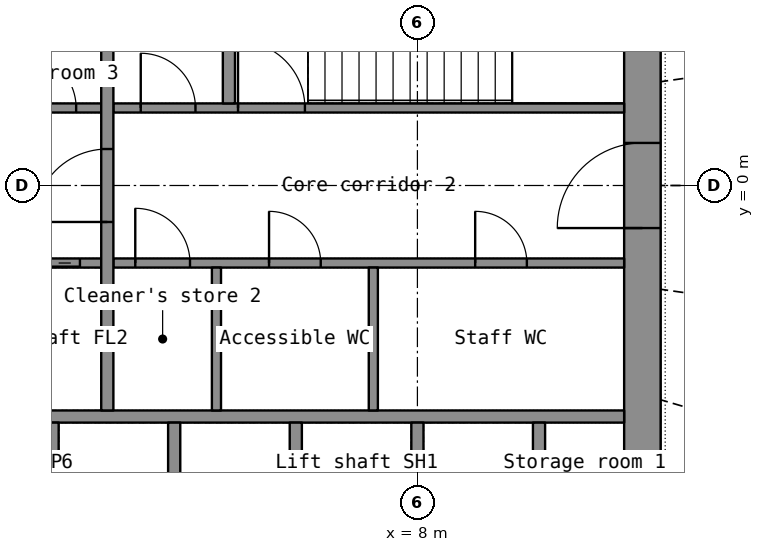
"""IFC4 building model, lengths in metres.
Left out: names, types, materials, properties, quantities, classifications, styles, units other than length and angle.
Written with IfcOpenShell. Run it as: python <this file> out.ifc"""

import sys

from ifc_helpers import new_model, si_unit, direction, frame, frame_2d, origin, place, context, subcontext, project, spatial, rectangle, extrude, element, fill, save


model = new_model("IFC4")
c1 = context("Model", 3, precision=1e-05, world=origin(), true_north=direction((0.0, 1.0)))
c2 = subcontext(c1, "Body", "Model", "MODEL_VIEW")
j1 = project(units=[si_unit("LENGTHUNIT", "METRE"), si_unit("PLANEANGLEUNIT", "RADIAN")], contexts=[c1])
p1 = place(None, origin())
s1 = spatial("IfcSite", under=j1, at=p1, CompositionType="ELEMENT")
p2 = place(p1, origin())
s2 = spatial("IfcBuilding", under=s1, at=p2, CompositionType="ELEMENT")
p3 = place(p2, frame((0.0, 0.0, 92.6)))
s3 = spatial("IfcBuildingStorey", under=s2, at=p3, CompositionType="ELEMENT", Elevation=92.6)
p4 = place(p3, frame((11.7, -7.2, 0.0), z_axis=(0.0, 0.0, 1.0), x_axis=(0.0, 1.0, 0.0)))
e1 = element("IfcWall", 1, at=p4, inside=s3, PredefinedType="SHEAR", context=c2, shape_type="SweptSolid", body=[
    extrude(rectangle(XDim=14.4, YDim=0.6, at=frame_2d((7.2, 0.0))), origin(), (0.0, 0.0, 1.0), 4.1),
])
p5 = place(p4, frame((6.5, 0.0, 0.0)))
e2 = element("IfcOpeningElement", 2, at=p5, cuts=e1, PredefinedType="OPENING", context=c2, shape_type="SweptSolid", body=[
    extrude(rectangle(XDim=1.4, YDim=2.2, at=frame_2d((0.7, 1.1))), frame((0.0, 0.31, 0.0), z_axis=(0.0, -1.0, 0.0), x_axis=(1.0, 0.0, 0.0)), (0.0, 0.0, 1.0), 0.62),
])
p6 = place(p3, frame((-11.4, -3.8, 0.0), z_axis=(0.0, 0.0, 1.0), x_axis=(1.0, 0.0, 0.0)))
e3 = element("IfcWall", 3, at=p6, inside=s3, PredefinedType="SHEAR", context=c2, shape_type="SweptSolid", body=[
    extrude(rectangle(XDim=22.8, YDim=0.2, at=frame_2d((11.4, 0.0))), origin(), (0.0, 0.0, 1.0), 4.1),
])
for number, where, z_axis, x_axis in (
    (4, (2.0, -6.6, 0.0), (0.0, 0.0, 1.0), (0.0, 1.0, 0.0)),
    (5, (4.0, -6.6, 0.0), (0.0, 0.0, 1.0), (0.0, 1.0, 0.0)),
    (6, (6.0, -6.6, 0.0), (0.0, 0.0, 1.0), (0.0, 1.0, 0.0)),
    (7, (8.0, -6.6, 0.0), (0.0, 0.0, 1.0), (0.0, 1.0, 0.0)),
    (8, (10.0, -6.6, 0.0), (0.0, 0.0, 1.0), (0.0, 1.0, 0.0)),
):
    element("IfcWall", number, at=place(p3, frame(where, z_axis=z_axis, x_axis=x_axis)), inside=s3, PredefinedType="SHEAR", context=c2, shape_type="SweptSolid", body=[
        extrude(rectangle(XDim=2.7, YDim=0.2, at=frame_2d((1.35, 0.0))), origin(), (0.0, 0.0, 1.0), 4.1),
    ])
p7 = place(p3, frame((-2.8, -1.275, 0.0), z_axis=(0.0, 0.0, 1.0), x_axis=(1.0, 0.0, 0.0)))
e9 = element("IfcWall", 9, at=p7, inside=s3, PredefinedType="SHEAR", context=c2, shape_type="SweptSolid", body=[
    extrude(rectangle(XDim=5.6, YDim=0.15, at=frame_2d((2.8, 0.0))), origin(), (0.0, 0.0, 1.0), 4.1),
])
p8 = place(p7, frame((4.15, 0.0, 0.0)))
e10 = element("IfcOpeningElement", 10, at=p8, cuts=e9, PredefinedType="OPENING", context=c2, shape_type="SweptSolid", body=[
    extrude(rectangle(XDim=1.1, YDim=2.2, at=frame_2d((0.55, 1.1))), frame((0.0, 0.085, 0.0), z_axis=(0.0, -1.0, 0.0), x_axis=(1.0, 0.0, 0.0)), (0.0, 0.0, 1.0), 0.17),
])
p9 = place(p7, frame((0.499, 0.0, 0.0)))
e11 = element("IfcOpeningElement", 11, at=p9, cuts=e9, PredefinedType="OPENING", context=c2, shape_type="SweptSolid", body=[
    extrude(rectangle(XDim=0.9, YDim=2.1, at=frame_2d((0.45, 1.05))), frame((0.0, 0.085, 0.0), z_axis=(0.0, -1.0, 0.0), x_axis=(1.0, 0.0, 0.0)), (0.0, 0.0, 1.0), 0.17),
])
p10 = place(p7, frame((2.374, 0.0, 0.0)))
e12 = element("IfcOpeningElement", 12, at=p10, cuts=e9, PredefinedType="OPENING", context=c2, shape_type="SweptSolid", body=[
    extrude(rectangle(XDim=0.9, YDim=2.1, at=frame_2d((0.45, 1.05))), frame((0.0, 0.085, 0.0), z_axis=(0.0, -1.0, 0.0), x_axis=(1.0, 0.0, 0.0)), (0.0, 0.0, 1.0), 0.17),
])
p11 = place(p3, frame((3.0, -1.275, 0.0), z_axis=(0.0, 0.0, 1.0), x_axis=(1.0, 0.0, 0.0)))
e13 = element("IfcWall", 13, at=p11, inside=s3, PredefinedType="PARTITIONING", context=c2, shape_type="SweptSolid", body=[
    extrude(rectangle(XDim=8.4, YDim=0.15, at=frame_2d((4.2, 0.0))), origin(), (0.0, 0.0, 1.0), 4.1),
])
p12 = place(p11, frame((0.36, 0.0, 0.0)))
e14 = element("IfcOpeningElement", 14, at=p12, cuts=e13, PredefinedType="OPENING", context=c2, shape_type="SweptSolid", body=[
    extrude(rectangle(XDim=0.9, YDim=2.1, at=frame_2d((0.45, 1.05))), frame((0.0, 0.085, 0.0), z_axis=(0.0, -1.0, 0.0), x_axis=(1.0, 0.0, 0.0)), (0.0, 0.0, 1.0), 0.17),
])
p13 = place(p11, frame((2.56, 0.0, 0.0)))
e15 = element("IfcOpeningElement", 15, at=p13, cuts=e13, PredefinedType="OPENING", context=c2, shape_type="SweptSolid", body=[
    extrude(rectangle(XDim=0.85, YDim=2.1, at=frame_2d((0.425, 1.05))), frame((0.0, 0.085, 0.0), z_axis=(0.0, -1.0, 0.0), x_axis=(1.0, 0.0, 0.0)), (0.0, 0.0, 1.0), 0.17),
])
p14 = place(p11, frame((5.95, 0.0, 0.0)))
e16 = element("IfcOpeningElement", 16, at=p14, cuts=e13, PredefinedType="OPENING", context=c2, shape_type="SweptSolid", body=[
    extrude(rectangle(XDim=0.85, YDim=2.1, at=frame_2d((0.425, 1.05))), frame((0.0, 0.085, 0.0), z_axis=(0.0, -1.0, 0.0), x_axis=(1.0, 0.0, 0.0)), (0.0, 0.0, 1.0), 0.17),
])
p15 = place(p3, frame((-2.8, 1.275, 0.0), z_axis=(0.0, 0.0, 1.0), x_axis=(1.0, 0.0, 0.0)))
e17 = element("IfcWall", 17, at=p15, inside=s3, PredefinedType="SHEAR", context=c2, shape_type="SweptSolid", body=[
    extrude(rectangle(XDim=5.6, YDim=0.15, at=frame_2d((2.8, 0.0))), origin(), (0.0, 0.0, 1.0), 4.1),
])
p16 = place(p15, frame((0.35, 0.0, 0.0)))
e18 = element("IfcOpeningElement", 18, at=p16, cuts=e17, PredefinedType="OPENING", context=c2, shape_type="SweptSolid", body=[
    extrude(rectangle(XDim=1.1, YDim=2.2, at=frame_2d((0.55, 1.1))), frame((0.0, 0.085, 0.0), z_axis=(0.0, -1.0, 0.0), x_axis=(1.0, 0.0, 0.0)), (0.0, 0.0, 1.0), 0.17),
])
p17 = place(p15, frame((2.413, 0.0, 0.0)))
e19 = element("IfcOpeningElement", 19, at=p17, cuts=e17, PredefinedType="OPENING", context=c2, shape_type="SweptSolid", body=[
    extrude(rectangle(XDim=0.9, YDim=2.1, at=frame_2d((0.45, 1.05))), frame((0.0, 0.085, 0.0), z_axis=(0.0, -1.0, 0.0), x_axis=(1.0, 0.0, 0.0)), (0.0, 0.0, 1.0), 0.17),
])
p18 = place(p15, frame((4.288, 0.0, 0.0)))
e20 = element("IfcOpeningElement", 20, at=p18, cuts=e17, PredefinedType="OPENING", context=c2, shape_type="SweptSolid", body=[
    extrude(rectangle(XDim=0.9, YDim=2.1, at=frame_2d((0.45, 1.05))), frame((0.0, 0.085, 0.0), z_axis=(0.0, -1.0, 0.0), x_axis=(1.0, 0.0, 0.0)), (0.0, 0.0, 1.0), 0.17),
])
p19 = place(p3, frame((3.0, 1.275, 0.0), z_axis=(0.0, 0.0, 1.0), x_axis=(1.0, 0.0, 0.0)))
e21 = element("IfcWall", 21, at=p19, inside=s3, PredefinedType="SHEAR", context=c2, shape_type="SweptSolid", body=[
    extrude(rectangle(XDim=8.4, YDim=0.15, at=frame_2d((4.2, 0.0))), origin(), (0.0, 0.0, 1.0), 4.1),
])
p20 = place(p19, frame((2.05, 0.0, 0.0)))
e22 = element("IfcOpeningElement", 22, at=p20, cuts=e21, PredefinedType="OPENING", context=c2, shape_type="SweptSolid", body=[
    extrude(rectangle(XDim=1.1, YDim=2.15, at=frame_2d((0.55, 1.075))), frame((0.0, 0.085, 0.0), z_axis=(0.0, -1.0, 0.0), x_axis=(1.0, 0.0, 0.0)), (0.0, 0.0, 1.0), 0.17),
])
p21 = place(p19, frame((0.45, 0.0, 0.0)))
e23 = element("IfcOpeningElement", 23, at=p21, cuts=e21, PredefinedType="OPENING", context=c2, shape_type="SweptSolid", body=[
    extrude(rectangle(XDim=0.9, YDim=2.1, at=frame_2d((0.45, 1.05))), frame((0.0, 0.085, 0.0), z_axis=(0.0, -1.0, 0.0), x_axis=(1.0, 0.0, 0.0)), (0.0, 0.0, 1.0), 0.17),
])
p22 = place(p3, frame((2.9, -3.7, 0.0), z_axis=(0.0, 0.0, 1.0), x_axis=(0.0, 1.0, 0.0)))
e24 = element("IfcWall", 24, at=p22, inside=s3, PredefinedType="SHEAR", context=c2, shape_type="SweptSolid", body=[
    extrude(rectangle(XDim=7.4, YDim=0.2, at=frame_2d((3.7, 0.0))), origin(), (0.0, 0.0, 1.0), 4.1),
])
p23 = place(p22, frame((3.1, 0.0, 0.0)))
e25 = element("IfcOpeningElement", 25, at=p23, cuts=e24, PredefinedType="OPENING", context=c2, shape_type="SweptSolid", body=[
    extrude(rectangle(XDim=1.2, YDim=2.2, at=frame_2d((0.6, 1.1))), frame((0.0, 0.11, 0.0), z_axis=(0.0, -1.0, 0.0), x_axis=(1.0, 0.0, 0.0)), (0.0, 0.0, 1.0), 0.22),
])
p24 = place(p3, frame((4.9, 1.35, 0.0), z_axis=(0.0, 0.0, 1.0), x_axis=(0.0, 1.0, 0.0)))
e26 = element("IfcWall", 26, at=p24, inside=s3, PredefinedType="SHEAR", context=c2, shape_type="SweptSolid", body=[
    extrude(rectangle(XDim=2.35, YDim=0.2, at=frame_2d((1.175, 0.0))), origin(), (0.0, 0.0, 1.0), 4.1),
])
for number, where, z_axis, x_axis in (
    (27, (4.695, -3.7, 0.0), (0.0, 0.0, 1.0), (0.0, 1.0, 0.0)),
    (28, (7.275, -3.7, 0.0), (0.0, 0.0, 1.0), (0.0, 1.0, 0.0)),
):
    element("IfcWall", number, at=place(p3, frame(where, z_axis=z_axis, x_axis=x_axis)), inside=s3, PredefinedType="PARTITIONING", context=c2, shape_type="SweptSolid", body=[
        extrude(rectangle(XDim=2.35, YDim=0.15, at=frame_2d((1.175, 0.0))), origin(), (0.0, 0.0, 1.0), 4.1),
    ])
p25 = place(p5, origin())
e29 = element("IfcDoor", 29, at=p25, inside=s3, OperationType="DOUBLE_DOOR_SINGLE_SWING", PredefinedType="DOOR", context=c2, shape_type="SweptSolid", body=[
    extrude(rectangle(XDim=1.4, YDim=2.2, at=frame_2d((0.7, 1.1))), frame((0.0, 0.025, 0.0), z_axis=(0.0, -1.0, 0.0), x_axis=(1.0, 0.0, 0.0)), (0.0, 0.0, 1.0), 0.05),
])
fill(e2, e29)
p26 = place(p23, origin())
e30 = element("IfcDoor", 30, at=p26, inside=s3, OperationType="SINGLE_SWING_LEFT", PredefinedType="DOOR", context=c2, shape_type="SweptSolid", body=[
    extrude(rectangle(XDim=1.2, YDim=2.2, at=frame_2d((0.6, 1.1))), frame((0.0, 0.025, 0.0), z_axis=(0.0, -1.0, 0.0), x_axis=(1.0, 0.0, 0.0)), (0.0, 0.0, 1.0), 0.05),
])
fill(e25, e30)
p27 = place(p8, origin())
e31 = element("IfcDoor", 31, at=p27, inside=s3, OperationType="DOUBLE_DOOR_SLIDING", PredefinedType="DOOR", context=c2, shape_type="SweptSolid", body=[
    extrude(rectangle(XDim=1.1, YDim=2.2, at=frame_2d((0.55, 1.1))), frame((0.0, 0.025, 0.0), z_axis=(0.0, -1.0, 0.0), x_axis=(1.0, 0.0, 0.0)), (0.0, 0.0, 1.0), 0.05),
])
fill(e10, e31)
p28 = place(p20, origin())
e32 = element("IfcDoor", 32, at=p28, inside=s3, OperationType="SINGLE_SWING_LEFT", PredefinedType="DOOR", context=c2, shape_type="SweptSolid", body=[
    extrude(rectangle(XDim=1.1, YDim=2.15, at=frame_2d((0.55, 1.075))), frame((0.0, 0.025, 0.0), z_axis=(0.0, -1.0, 0.0), x_axis=(1.0, 0.0, 0.0)), (0.0, 0.0, 1.0), 0.05),
])
fill(e22, e32)
p29 = place(p12, origin())
e33 = element("IfcDoor", 33, at=p29, inside=s3, OperationType="SINGLE_SWING_LEFT", PredefinedType="DOOR", context=c2, shape_type="SweptSolid", body=[
    extrude(rectangle(XDim=0.9, YDim=2.1, at=frame_2d((0.45, 1.05))), frame((0.0, 0.025, 0.0), z_axis=(0.0, -1.0, 0.0), x_axis=(1.0, 0.0, 0.0)), (0.0, 0.0, 1.0), 0.05),
])
fill(e14, e33)
p30 = place(p13, origin())
e34 = element("IfcDoor", 34, at=p30, inside=s3, OperationType="SINGLE_SWING_LEFT", PredefinedType="DOOR", context=c2, shape_type="SweptSolid", body=[
    extrude(rectangle(XDim=0.85, YDim=2.1, at=frame_2d((0.425, 1.05))), frame((0.0, 0.025, 0.0), z_axis=(0.0, -1.0, 0.0), x_axis=(1.0, 0.0, 0.0)), (0.0, 0.0, 1.0), 0.05),
])
fill(e15, e34)
p31 = place(p14, origin())
e35 = element("IfcDoor", 35, at=p31, inside=s3, OperationType="SINGLE_SWING_LEFT", PredefinedType="DOOR", context=c2, shape_type="SweptSolid", body=[
    extrude(rectangle(XDim=0.85, YDim=2.1, at=frame_2d((0.425, 1.05))), frame((0.0, 0.025, 0.0), z_axis=(0.0, -1.0, 0.0), x_axis=(1.0, 0.0, 0.0)), (0.0, 0.0, 1.0), 0.05),
])
fill(e16, e35)
p32 = place(p18, origin())
e36 = element("IfcDoor", 36, at=p32, inside=s3, OperationType="SINGLE_SWING_LEFT", PredefinedType="DOOR", context=c2, shape_type="SweptSolid", body=[
    extrude(rectangle(XDim=0.9, YDim=2.1, at=frame_2d((0.45, 1.05))), frame((0.0, 0.025, 0.0), z_axis=(0.0, -1.0, 0.0), x_axis=(1.0, 0.0, 0.0)), (0.0, 0.0, 1.0), 0.05),
])
fill(e20, e36)
p33 = place(p21, origin())
e37 = element("IfcDoor", 37, at=p33, inside=s3, OperationType="SINGLE_SWING_LEFT", PredefinedType="DOOR", context=c2, shape_type="SweptSolid", body=[
    extrude(rectangle(XDim=0.9, YDim=2.1, at=frame_2d((0.45, 1.05))), frame((0.0, 0.025, 0.0), z_axis=(0.0, -1.0, 0.0), x_axis=(1.0, 0.0, 0.0)), (0.0, 0.0, 1.0), 0.05),
])
fill(e23, e37)
save(model, sys.argv[1])
